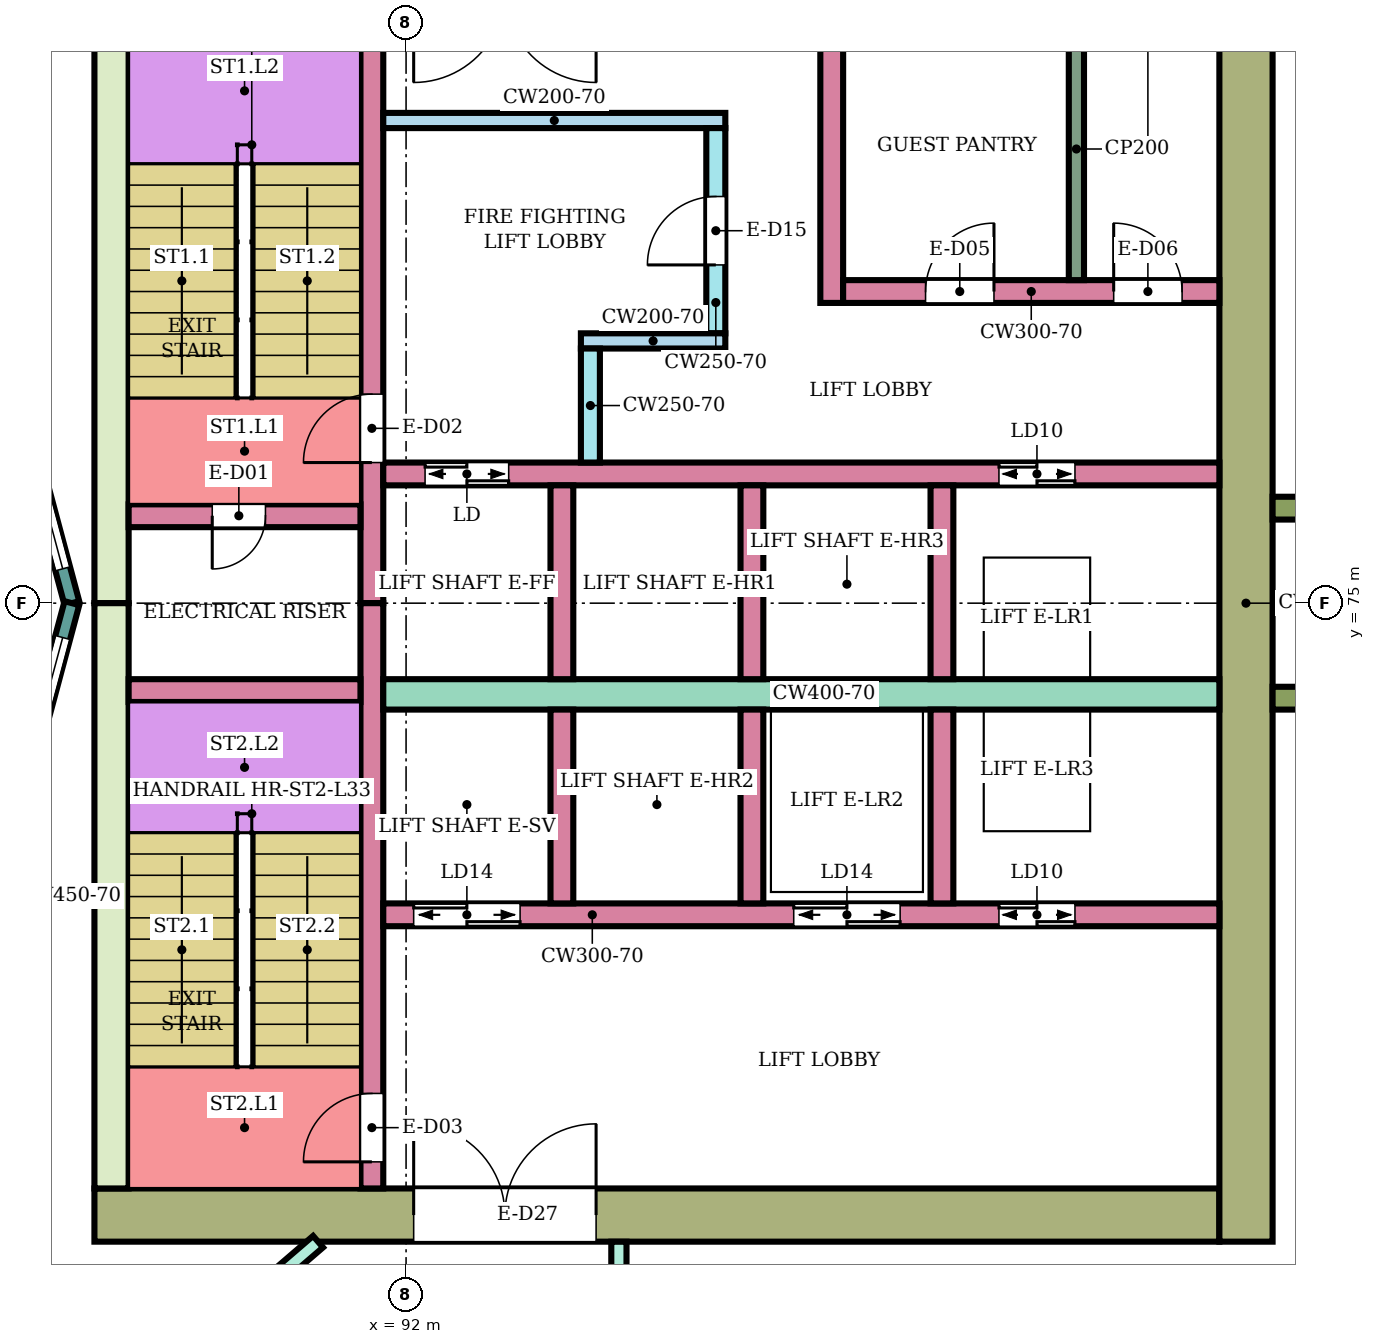
"""IFC4 building model, lengths in metres.
Left out: names, types, materials, properties, quantities, classifications, styles, units other than length and angle.
Written with IfcOpenShell. Run it as: python <this file> out.ifc"""

import sys

from ifc_helpers import new_model, si_unit, direction, frame, frame_2d, origin, place, context, subcontext, project, spatial, rectangle, extrude, element, fill, save


model = new_model("IFC4")
c1 = context("Model", 3, precision=1e-05, world=origin(), true_north=direction((0.0, 1.0)))
c2 = subcontext(c1, "Body", "Model", "MODEL_VIEW")
j1 = project(units=[si_unit("LENGTHUNIT", "METRE"), si_unit("PLANEANGLEUNIT", "RADIAN")], contexts=[c1])
p1 = place(None, origin())
s1 = spatial("IfcSite", under=j1, at=p1, CompositionType="ELEMENT")
p2 = place(p1, origin())
s2 = spatial("IfcBuilding", under=s1, at=p2, CompositionType="ELEMENT")
p3 = place(p2, frame((0.0, 0.0, 141.9)))
s3 = spatial("IfcBuildingStorey", under=s2, at=p3, CompositionType="ELEMENT", Elevation=141.9)
p4 = place(p3, frame((87.9, 66.95, 0.0), z_axis=(0.0, 0.0, 1.0), x_axis=(1.0, 0.0, 0.0)))
e1 = element("IfcWall", 1, at=p4, inside=s3, PredefinedType="SHEAR", context=c2, shape_type="SweptSolid", body=[
    extrude(rectangle(XDim=14.8, YDim=0.7, at=frame_2d((7.4, 0.0))), origin(), (0.0, 0.0, 1.0), 3.58),
])
p5 = place(p4, frame((4.2, 0.0, 0.0)))
e2 = element("IfcOpeningElement", 2, at=p5, cuts=e1, PredefinedType="OPENING", context=c2, shape_type="SweptSolid", body=[
    extrude(rectangle(XDim=2.4, YDim=2.4, at=frame_2d((1.2, 1.2))), frame((0.0, 0.36, 0.0), z_axis=(0.0, -1.0, 0.0), x_axis=(1.0, 0.0, 0.0)), (0.0, 0.0, 1.0), 0.72),
])
for number, where, z_axis, x_axis in (
    (3, (88.125, 75.0, 0.0), (0.0, 0.0, 1.0), (0.0, 1.0, 0.0)),
    (4, (88.125, 67.3, 0.0), (0.0, 0.0, 1.0), (0.0, 1.0, 0.0)),
):
    element("IfcWall", number, at=place(p3, frame(where, z_axis=z_axis, x_axis=x_axis)), inside=s3, PredefinedType="SHEAR", context=c2, shape_type="SweptSolid", body=[
        extrude(rectangle(XDim=7.7, YDim=0.45, at=frame_2d((3.85, 0.0))), origin(), (0.0, 0.0, 1.0), 3.58),
    ])
p6 = place(p3, frame((103.05, 66.6, 0.0), z_axis=(0.0, 0.0, 1.0), x_axis=(0.0, 1.0, 0.0)))
e5 = element("IfcWall", 5, at=p6, inside=s3, PredefinedType="SHEAR", context=c2, shape_type="SweptSolid", body=[
    extrude(rectangle(XDim=16.8, YDim=0.7, at=frame_2d((8.4, 0.0))), origin(), (0.0, 0.0, 1.0), 3.58),
])
p7 = place(p3, frame((91.55, 75.0, 0.0), z_axis=(0.0, 0.0, 1.0), x_axis=(0.0, 1.0, 0.0)))
e6 = element("IfcWall", 6, at=p7, inside=s3, PredefinedType="SHEAR", context=c2, shape_type="SweptSolid", body=[
    extrude(rectangle(XDim=7.7, YDim=0.3, at=frame_2d((3.85, 0.0))), origin(), (0.0, 0.0, 1.0), 3.58),
])
p8 = place(p7, frame((1.85, 0.0, 0.0)))
e7 = element("IfcOpeningElement", 7, at=p8, cuts=e6, PredefinedType="OPENING", context=c2, shape_type="SweptSolid", body=[
    extrude(rectangle(XDim=0.9, YDim=2.1, at=frame_2d((0.45, 1.05))), frame((0.0, 0.16, 0.0), z_axis=(0.0, -1.0, 0.0), x_axis=(1.0, 0.0, 0.0)), (0.0, 0.0, 1.0), 0.32),
])
p9 = place(p3, frame((91.55, 67.3, 0.0), z_axis=(0.0, 0.0, 1.0), x_axis=(0.0, 1.0, 0.0)))
e8 = element("IfcWall", 8, at=p9, inside=s3, PredefinedType="SHEAR", context=c2, shape_type="SweptSolid", body=[
    extrude(rectangle(XDim=7.7, YDim=0.3, at=frame_2d((3.85, 0.0))), origin(), (0.0, 0.0, 1.0), 3.58),
])
p10 = place(p9, frame((0.35, 0.0, 0.0)))
e9 = element("IfcOpeningElement", 9, at=p10, cuts=e8, PredefinedType="OPENING", context=c2, shape_type="SweptSolid", body=[
    extrude(rectangle(XDim=0.9, YDim=2.1, at=frame_2d((0.45, 1.05))), frame((0.0, 0.16, 0.0), z_axis=(0.0, -1.0, 0.0), x_axis=(1.0, 0.0, 0.0)), (0.0, 0.0, 1.0), 0.32),
])
p11 = place(p3, frame((88.35, 76.15, 0.0), z_axis=(0.0, 0.0, 1.0), x_axis=(1.0, 0.0, 0.0)))
e10 = element("IfcWall", 10, at=p11, inside=s3, PredefinedType="SHEAR", context=c2, shape_type="SweptSolid", body=[
    extrude(rectangle(XDim=3.05, YDim=0.3, at=frame_2d((1.525, 0.0))), origin(), (0.0, 0.0, 1.0), 3.58),
])
p12 = place(p11, frame((1.1, 0.0, 0.0)))
e11 = element("IfcOpeningElement", 11, at=p12, cuts=e10, PredefinedType="OPENING", context=c2, shape_type="SweptSolid", body=[
    extrude(rectangle(XDim=0.7, YDim=2.0, at=frame_2d((0.35, 1.0))), frame((0.0, 0.16, 0.0), z_axis=(0.0, -1.0, 0.0), x_axis=(1.0, 0.0, 0.0)), (0.0, 0.0, 1.0), 0.32),
])
p13 = place(p3, frame((88.35, 73.85, 0.0), z_axis=(0.0, 0.0, 1.0), x_axis=(1.0, 0.0, 0.0)))
e12 = element("IfcWall", 12, at=p13, inside=s3, PredefinedType="SHEAR", context=c2, shape_type="SweptSolid", body=[
    extrude(rectangle(XDim=3.05, YDim=0.3, at=frame_2d((1.525, 0.0))), origin(), (0.0, 0.0, 1.0), 3.58),
])
p14 = place(p3, frame((91.7, 76.7, 0.0), z_axis=(0.0, 0.0, 1.0), x_axis=(1.0, 0.0, 0.0)))
e13 = element("IfcWall", 13, at=p14, inside=s3, PredefinedType="SHEAR", context=c2, shape_type="SweptSolid", body=[
    extrude(rectangle(XDim=11.0, YDim=0.3, at=frame_2d((5.5, 0.0))), origin(), (0.0, 0.0, 1.0), 3.58),
])
p15 = place(p14, frame((0.55, 0.0, 0.0)))
e14 = element("IfcOpeningElement", 14, at=p15, cuts=e13, PredefinedType="OPENING", context=c2, shape_type="SweptSolid", body=[
    extrude(rectangle(XDim=1.1, YDim=2.1, at=frame_2d((0.55, 1.05))), frame((0.0, 0.16, 0.0), z_axis=(0.0, -1.0, 0.0), x_axis=(1.0, 0.0, 0.0)), (0.0, 0.0, 1.0), 0.32),
])
p16 = place(p14, frame((8.1, 0.0, 0.0)))
e15 = element("IfcOpeningElement", 15, at=p16, cuts=e13, PredefinedType="OPENING", context=c2, shape_type="SweptSolid", body=[
    extrude(rectangle(XDim=1.0, YDim=2.1, at=frame_2d((0.5, 1.05))), frame((0.0, 0.16, 0.0), z_axis=(0.0, -1.0, 0.0), x_axis=(1.0, 0.0, 0.0)), (0.0, 0.0, 1.0), 0.32),
])
p17 = place(p3, frame((91.7, 73.8, 0.0), z_axis=(0.0, 0.0, 1.0), x_axis=(1.0, 0.0, 0.0)))
e16 = element("IfcWall", 16, at=p17, inside=s3, PredefinedType="SHEAR", context=c2, shape_type="SweptSolid", body=[
    extrude(rectangle(XDim=11.0, YDim=0.4, at=frame_2d((5.5, 0.0))), origin(), (0.0, 0.0, 1.0), 3.58),
])
p18 = place(p3, frame((91.7, 70.9, 0.0), z_axis=(0.0, 0.0, 1.0), x_axis=(1.0, 0.0, 0.0)))
e17 = element("IfcWall", 17, at=p18, inside=s3, PredefinedType="SHEAR", context=c2, shape_type="SweptSolid", body=[
    extrude(rectangle(XDim=11.0, YDim=0.3, at=frame_2d((5.5, 0.0))), origin(), (0.0, 0.0, 1.0), 3.58),
])
p19 = place(p18, frame((0.4, 0.0, 0.0)))
e18 = element("IfcOpeningElement", 18, at=p19, cuts=e17, PredefinedType="OPENING", context=c2, shape_type="SweptSolid", body=[
    extrude(rectangle(XDim=1.4, YDim=2.1, at=frame_2d((0.7, 1.05))), frame((0.0, 0.16, 0.0), z_axis=(0.0, -1.0, 0.0), x_axis=(1.0, 0.0, 0.0)), (0.0, 0.0, 1.0), 0.32),
])
p20 = place(p18, frame((5.4, 0.0, 0.0)))
e19 = element("IfcOpeningElement", 19, at=p20, cuts=e17, PredefinedType="OPENING", context=c2, shape_type="SweptSolid", body=[
    extrude(rectangle(XDim=1.4, YDim=2.1, at=frame_2d((0.7, 1.05))), frame((0.0, 0.16, 0.0), z_axis=(0.0, -1.0, 0.0), x_axis=(1.0, 0.0, 0.0)), (0.0, 0.0, 1.0), 0.32),
])
p21 = place(p18, frame((8.1, 0.0, 0.0)))
e20 = element("IfcOpeningElement", 20, at=p21, cuts=e17, PredefinedType="OPENING", context=c2, shape_type="SweptSolid", body=[
    extrude(rectangle(XDim=1.0, YDim=2.1, at=frame_2d((0.5, 1.05))), frame((0.0, 0.16, 0.0), z_axis=(0.0, -1.0, 0.0), x_axis=(1.0, 0.0, 0.0)), (0.0, 0.0, 1.0), 0.32),
])
for number, where, z_axis, x_axis in (
    (21, (94.05, 74.0, 0.0), (0.0, 0.0, 1.0), (0.0, 1.0, 0.0)),
    (22, (96.55, 74.0, 0.0), (0.0, 0.0, 1.0), (0.0, 1.0, 0.0)),
    (23, (99.05, 74.0, 0.0), (0.0, 0.0, 1.0), (0.0, 1.0, 0.0)),
    (24, (94.05, 71.05, 0.0), (0.0, 0.0, 1.0), (0.0, 1.0, 0.0)),
    (25, (96.55, 71.05, 0.0), (0.0, 0.0, 1.0), (0.0, 1.0, 0.0)),
    (26, (99.05, 71.05, 0.0), (0.0, 0.0, 1.0), (0.0, 1.0, 0.0)),
):
    element("IfcWall", number, at=place(p3, frame(where, z_axis=z_axis, x_axis=x_axis)), inside=s3, PredefinedType="SHEAR", context=c2, shape_type="SweptSolid", body=[
        extrude(rectangle(XDim=2.55, YDim=0.3, at=frame_2d((1.275, 0.0))), origin(), (0.0, 0.0, 1.0), 3.58),
    ])
p22 = place(p3, frame((91.7, 81.35, 0.0), z_axis=(0.0, 0.0, 1.0), x_axis=(1.0, 0.0, 0.0)))
e27 = element("IfcWall", 27, at=p22, inside=s3, PredefinedType="SHEAR", context=c2, shape_type="SweptSolid", body=[
    extrude(rectangle(XDim=4.5, YDim=0.2, at=frame_2d((2.25, 0.0))), origin(), (0.0, 0.0, 1.0), 3.58),
])
p23 = place(p3, frame((96.075, 78.55, 0.0), z_axis=(0.0, 0.0, 1.0), x_axis=(0.0, 1.0, 0.0)))
e28 = element("IfcWall", 28, at=p23, inside=s3, PredefinedType="SHEAR", context=c2, shape_type="SweptSolid", body=[
    extrude(rectangle(XDim=2.7, YDim=0.25, at=frame_2d((1.35, 0.0))), origin(), (0.0, 0.0, 1.0), 3.58),
])
p24 = place(p23, frame((0.9, 0.0, 0.0)))
e29 = element("IfcOpeningElement", 29, at=p24, cuts=e28, PredefinedType="OPENING", context=c2, shape_type="SweptSolid", body=[
    extrude(rectangle(XDim=0.9, YDim=2.1, at=frame_2d((0.45, 1.05))), frame((0.0, 0.135, 0.0), z_axis=(0.0, -1.0, 0.0), x_axis=(1.0, 0.0, 0.0)), (0.0, 0.0, 1.0), 0.27),
])
p25 = place(p3, frame((94.3, 78.45, 0.0), z_axis=(0.0, 0.0, 1.0), x_axis=(1.0, 0.0, 0.0)))
e30 = element("IfcWall", 30, at=p25, inside=s3, PredefinedType="SHEAR", context=c2, shape_type="SweptSolid", body=[
    extrude(rectangle(XDim=1.9, YDim=0.2, at=frame_2d((0.95, 0.0))), origin(), (0.0, 0.0, 1.0), 3.58),
])
p26 = place(p3, frame((94.425, 76.85, 0.0), z_axis=(0.0, 0.0, 1.0), x_axis=(0.0, 1.0, 0.0)))
e31 = element("IfcWall", 31, at=p26, inside=s3, PredefinedType="SHEAR", context=c2, shape_type="SweptSolid", body=[
    extrude(rectangle(XDim=1.5, YDim=0.25, at=frame_2d((0.75, 0.0))), origin(), (0.0, 0.0, 1.0), 3.58),
])
p27 = place(p3, frame((97.6, 78.95, 0.0), z_axis=(0.0, 0.0, 1.0), x_axis=(0.0, 1.0, 0.0)))
e32 = element("IfcWall", 32, at=p27, inside=s3, PredefinedType="SHEAR", context=c2, shape_type="SweptSolid", body=[
    extrude(rectangle(XDim=3.75, YDim=0.3, at=frame_2d((1.875, 0.0))), origin(), (0.0, 0.0, 1.0), 3.58),
])
p28 = place(p3, frame((97.75, 79.1, 0.0), z_axis=(0.0, 0.0, 1.0), x_axis=(1.0, 0.0, 0.0)))
e33 = element("IfcWall", 33, at=p28, inside=s3, PredefinedType="SHEAR", context=c2, shape_type="SweptSolid", body=[
    extrude(rectangle(XDim=4.95, YDim=0.3, at=frame_2d((2.475, 0.0))), origin(), (0.0, 0.0, 1.0), 3.58),
])
p29 = place(p28, frame((1.084, 0.0, 0.0)))
e34 = element("IfcOpeningElement", 34, at=p29, cuts=e33, PredefinedType="OPENING", context=c2, shape_type="SweptSolid", body=[
    extrude(rectangle(XDim=0.9, YDim=2.1, at=frame_2d((0.45, 1.05))), frame((0.0, 0.16, 0.0), z_axis=(0.0, -1.0, 0.0), x_axis=(1.0, 0.0, 0.0)), (0.0, 0.0, 1.0), 0.32),
])
p30 = place(p28, frame((3.56, 0.0, 0.0)))
e35 = element("IfcOpeningElement", 35, at=p30, cuts=e33, PredefinedType="OPENING", context=c2, shape_type="SweptSolid", body=[
    extrude(rectangle(XDim=0.9, YDim=2.1, at=frame_2d((0.45, 1.05))), frame((0.0, 0.16, 0.0), z_axis=(0.0, -1.0, 0.0), x_axis=(1.0, 0.0, 0.0)), (0.0, 0.0, 1.0), 0.32),
])
for number, where, z_axis, x_axis in (
    (36, (103.4, 73.75, 0.0), (0.0, 0.0, 1.0), (1.0, 0.0, 0.0)),
    (37, (103.4, 76.25, 0.0), (0.0, 0.0, 1.0), (1.0, 0.0, 0.0)),
):
    element("IfcWall", number, at=place(p3, frame(where, z_axis=z_axis, x_axis=x_axis)), inside=s3, PredefinedType="NOTDEFINED", context=c2, shape_type="SweptSolid", body=[
        extrude(rectangle(XDim=2.416, YDim=0.3, at=frame_2d((1.208, 0.0))), origin(), (0.0, 0.0, 1.0), 3.9),
    ])
p31 = place(p3, frame((87.604, 75.0, 0.0), z_axis=(0.0, 0.0, 1.0), x_axis=(-0.258789828301, 0.965933654434, 0.0)))
e38 = element("IfcWall", 38, at=p31, inside=s3, PredefinedType="NOTDEFINED", context=c2, shape_type="SweptSolid", body=[
    extrude(rectangle(XDim=3.936, YDim=0.2, at=frame_2d((1.968, 0.0))), origin(), (0.0, 0.0, 1.0), 3.9),
])
p32 = place(p31, frame((0.468, 0.0, 0.9)))
e39 = element("IfcOpeningElement", 39, at=p32, cuts=e38, PredefinedType="OPENING", context=c2, shape_type="SweptSolid", body=[
    extrude(rectangle(XDim=3.0, YDim=2.3, at=frame_2d((1.5, 1.15))), frame((0.0, 0.11, 0.0), z_axis=(0.0, -1.0, 0.0), x_axis=(1.0, 0.0, 0.0)), (0.0, 0.0, 1.0), 0.22),
])
p33 = place(p3, frame((86.585, 71.198, 0.0), z_axis=(0.0, 0.0, 1.0), x_axis=(0.258789828301, 0.965933654434, 0.0)))
e40 = element("IfcWall", 40, at=p33, inside=s3, PredefinedType="NOTDEFINED", context=c2, shape_type="SweptSolid", body=[
    extrude(rectangle(XDim=3.936, YDim=0.2, at=frame_2d((1.968, 0.0))), origin(), (0.0, 0.0, 1.0), 3.9),
])
p34 = place(p33, frame((0.468, 0.0, 0.9)))
e41 = element("IfcOpeningElement", 41, at=p34, cuts=e40, PredefinedType="OPENING", context=c2, shape_type="SweptSolid", body=[
    extrude(rectangle(XDim=3.0, YDim=2.3, at=frame_2d((1.5, 1.15))), frame((0.0, 0.11, 0.0), z_axis=(0.0, -1.0, 0.0), x_axis=(1.0, 0.0, 0.0)), (0.0, 0.0, 1.0), 0.22),
])
p35 = place(p3, frame((86.877, 63.189, 0.0), z_axis=(0.0, 0.0, 1.0), x_axis=(0.758164888471, 0.652062881853, 0.0)))
e42 = element("IfcWall", 42, at=p35, inside=s3, PredefinedType="PARTITIONING", context=c2, shape_type="SweptSolid", body=[
    extrude(rectangle(XDim=5.23, YDim=0.2, at=frame_2d((2.615, 0.0))), origin(), (0.0, 0.0, 1.0), 3.45),
])
p36 = place(p35, frame((2.63, 0.0, 0.0)))
e43 = element("IfcOpeningElement", 43, at=p36, cuts=e42, PredefinedType="OPENING", context=c2, shape_type="SweptSolid", body=[
    extrude(rectangle(XDim=1.0, YDim=2.1, at=frame_2d((0.5, 1.05))), frame((0.0, 0.11, 0.0), z_axis=(0.0, -1.0, 0.0), x_axis=(1.0, 0.0, 0.0)), (0.0, 0.0, 1.0), 0.22),
])
p37 = place(p3, frame((94.8, 65.1, 0.0), z_axis=(0.0, 0.0, 1.0), x_axis=(0.0, 1.0, 0.0)))
e44 = element("IfcWall", 44, at=p37, inside=s3, PredefinedType="PARTITIONING", context=c2, shape_type="SweptSolid", body=[
    extrude(rectangle(XDim=1.499, YDim=0.2, at=frame_2d((0.75, 0.0))), origin(), (0.0, 0.0, 1.0), 3.45),
])
p38 = place(p3, frame((86.643, 66.681, 0.0), z_axis=(0.0, 0.0, 1.0), x_axis=(0.652264876065, -0.757991115682, 0.0)))
e45 = element("IfcWall", 45, at=p38, inside=s3, PredefinedType="PARTITIONING", context=c2, shape_type="SweptSolid", body=[
    extrude(rectangle(XDim=2.699, YDim=0.1, at=frame_2d((1.35, 0.0))), origin(), (0.0, 0.0, 1.0), 3.45),
])
p39 = place(p38, frame((1.3, 0.0, 0.0)))
e46 = element("IfcOpeningElement", 46, at=p39, cuts=e45, PredefinedType="OPENING", context=c2, shape_type="SweptSolid", body=[
    extrude(rectangle(XDim=0.8, YDim=2.1, at=frame_2d((0.4, 1.05))), frame((0.0, 0.06, 0.0), z_axis=(0.0, -1.0, 0.0), x_axis=(1.0, 0.0, 0.0)), (0.0, 0.0, 1.0), 0.12),
])
p40 = place(p3, frame((100.819, 79.25, 0.0), z_axis=(0.0, 0.0, 1.0), x_axis=(0.0, 1.0, 0.0)))
e47 = element("IfcWall", 47, at=p40, inside=s3, PredefinedType="PARTITIONING", context=c2, shape_type="SweptSolid", body=[
    extrude(rectangle(XDim=3.45, YDim=0.2, at=frame_2d((1.725, 0.0))), origin(), (0.0, 0.0, 1.0), 3.58),
])
p41 = place(p32, origin())
e48 = element("IfcWindow", 48, at=p41, inside=s3, PartitioningType="SINGLE_PANEL", PredefinedType="WINDOW", context=c2, shape_type="SweptSolid", body=[
    extrude(rectangle(XDim=3.0, YDim=2.3, at=frame_2d((1.5, 1.15))), frame((0.0, 0.03, 0.0), z_axis=(0.0, -1.0, 0.0), x_axis=(1.0, 0.0, 0.0)), (0.0, 0.0, 1.0), 0.06),
])
fill(e39, e48)
p42 = place(p34, origin())
e49 = element("IfcWindow", 49, at=p42, inside=s3, PartitioningType="SINGLE_PANEL", PredefinedType="WINDOW", context=c2, shape_type="SweptSolid", body=[
    extrude(rectangle(XDim=3.0, YDim=2.3, at=frame_2d((1.5, 1.15))), frame((0.0, 0.03, 0.0), z_axis=(0.0, -1.0, 0.0), x_axis=(1.0, 0.0, 0.0)), (0.0, 0.0, 1.0), 0.06),
])
fill(e41, e49)
p43 = place(p12, frame((0.7, 0.0, 0.0), z_axis=(0.0, 0.0, 1.0), x_axis=(-1.0, 0.0, 0.0)))
e50 = element("IfcDoor", 50, at=p43, inside=s3, OperationType="SINGLE_SWING_RIGHT", PredefinedType="DOOR", context=c2, shape_type="SweptSolid", body=[
    extrude(rectangle(XDim=0.7, YDim=2.0, at=frame_2d((0.35, 1.0))), frame((0.0, 0.025, 0.0), z_axis=(0.0, -1.0, 0.0), x_axis=(1.0, 0.0, 0.0)), (0.0, 0.0, 1.0), 0.05),
])
fill(e11, e50)
p44 = place(p8, origin())
e51 = element("IfcDoor", 51, at=p44, inside=s3, OperationType="SINGLE_SWING_LEFT", PredefinedType="DOOR", context=c2, shape_type="SweptSolid", body=[
    extrude(rectangle(XDim=0.9, YDim=2.1, at=frame_2d((0.45, 1.05))), frame((0.0, 0.025, 0.0), z_axis=(0.0, -1.0, 0.0), x_axis=(1.0, 0.0, 0.0)), (0.0, 0.0, 1.0), 0.05),
])
fill(e7, e51)
p45 = place(p10, origin())
e52 = element("IfcDoor", 52, at=p45, inside=s3, OperationType="SINGLE_SWING_LEFT", PredefinedType="DOOR", context=c2, shape_type="SweptSolid", body=[
    extrude(rectangle(XDim=0.9, YDim=2.1, at=frame_2d((0.45, 1.05))), frame((0.0, 0.025, 0.0), z_axis=(0.0, -1.0, 0.0), x_axis=(1.0, 0.0, 0.0)), (0.0, 0.0, 1.0), 0.05),
])
fill(e9, e52)
p46 = place(p15, origin())
e53 = element("IfcDoor", 53, at=p46, inside=s3, OperationType="DOUBLE_DOOR_SLIDING", PredefinedType="DOOR", context=c2, shape_type="SweptSolid", body=[
    extrude(rectangle(XDim=1.1, YDim=2.1, at=frame_2d((0.55, 1.05))), frame((0.0, 0.025, 0.0), z_axis=(0.0, -1.0, 0.0), x_axis=(1.0, 0.0, 0.0)), (0.0, 0.0, 1.0), 0.05),
])
fill(e14, e53)
p47 = place(p16, origin())
e54 = element("IfcDoor", 54, at=p47, inside=s3, OperationType="DOUBLE_DOOR_SLIDING", PredefinedType="DOOR", context=c2, shape_type="SweptSolid", body=[
    extrude(rectangle(XDim=1.0, YDim=2.1, at=frame_2d((0.5, 1.05))), frame((0.0, 0.025, 0.0), z_axis=(0.0, -1.0, 0.0), x_axis=(1.0, 0.0, 0.0)), (0.0, 0.0, 1.0), 0.05),
])
fill(e15, e54)
p48 = place(p19, origin())
e55 = element("IfcDoor", 55, at=p48, inside=s3, OperationType="DOUBLE_DOOR_SLIDING", PredefinedType="DOOR", context=c2, shape_type="SweptSolid", body=[
    extrude(rectangle(XDim=1.4, YDim=2.1, at=frame_2d((0.7, 1.05))), frame((0.0, 0.025, 0.0), z_axis=(0.0, -1.0, 0.0), x_axis=(1.0, 0.0, 0.0)), (0.0, 0.0, 1.0), 0.05),
])
fill(e18, e55)
p49 = place(p20, origin())
e56 = element("IfcDoor", 56, at=p49, inside=s3, OperationType="DOUBLE_DOOR_SLIDING", PredefinedType="DOOR", context=c2, shape_type="SweptSolid", body=[
    extrude(rectangle(XDim=1.4, YDim=2.1, at=frame_2d((0.7, 1.05))), frame((0.0, 0.025, 0.0), z_axis=(0.0, -1.0, 0.0), x_axis=(1.0, 0.0, 0.0)), (0.0, 0.0, 1.0), 0.05),
])
fill(e19, e56)
p50 = place(p21, origin())
e57 = element("IfcDoor", 57, at=p50, inside=s3, OperationType="DOUBLE_DOOR_SLIDING", PredefinedType="DOOR", context=c2, shape_type="SweptSolid", body=[
    extrude(rectangle(XDim=1.0, YDim=2.1, at=frame_2d((0.5, 1.05))), frame((0.0, 0.025, 0.0), z_axis=(0.0, -1.0, 0.0), x_axis=(1.0, 0.0, 0.0)), (0.0, 0.0, 1.0), 0.05),
])
fill(e20, e57)
p51 = place(p24, origin())
e58 = element("IfcDoor", 58, at=p51, inside=s3, OperationType="SINGLE_SWING_LEFT", PredefinedType="DOOR", context=c2, shape_type="SweptSolid", body=[
    extrude(rectangle(XDim=0.9, YDim=2.1, at=frame_2d((0.45, 1.05))), frame((0.0, 0.025, 0.0), z_axis=(0.0, -1.0, 0.0), x_axis=(1.0, 0.0, 0.0)), (0.0, 0.0, 1.0), 0.05),
])
fill(e29, e58)
p52 = place(p29, origin())
e59 = element("IfcDoor", 59, at=p52, inside=s3, OperationType="SINGLE_SWING_RIGHT", PredefinedType="DOOR", context=c2, shape_type="SweptSolid", body=[
    extrude(rectangle(XDim=0.9, YDim=2.1, at=frame_2d((0.45, 1.05))), frame((0.0, 0.025, 0.0), z_axis=(0.0, -1.0, 0.0), x_axis=(1.0, 0.0, 0.0)), (0.0, 0.0, 1.0), 0.05),
])
fill(e34, e59)
p53 = place(p30, origin())
e60 = element("IfcDoor", 60, at=p53, inside=s3, OperationType="SINGLE_SWING_LEFT", PredefinedType="DOOR", context=c2, shape_type="SweptSolid", body=[
    extrude(rectangle(XDim=0.9, YDim=2.1, at=frame_2d((0.45, 1.05))), frame((0.0, 0.025, 0.0), z_axis=(0.0, -1.0, 0.0), x_axis=(1.0, 0.0, 0.0)), (0.0, 0.0, 1.0), 0.05),
])
fill(e35, e60)
p54 = place(p5, origin())
e61 = element("IfcDoor", 61, at=p54, inside=s3, OperationType="DOUBLE_DOOR_SINGLE_SWING", PredefinedType="DOOR", context=c2, shape_type="SweptSolid", body=[
    extrude(rectangle(XDim=2.4, YDim=2.4, at=frame_2d((1.2, 1.2))), frame((0.0, 0.025, 0.0), z_axis=(0.0, -1.0, 0.0), x_axis=(1.0, 0.0, 0.0)), (0.0, 0.0, 1.0), 0.05),
])
fill(e2, e61)
save(model, sys.argv[1])
